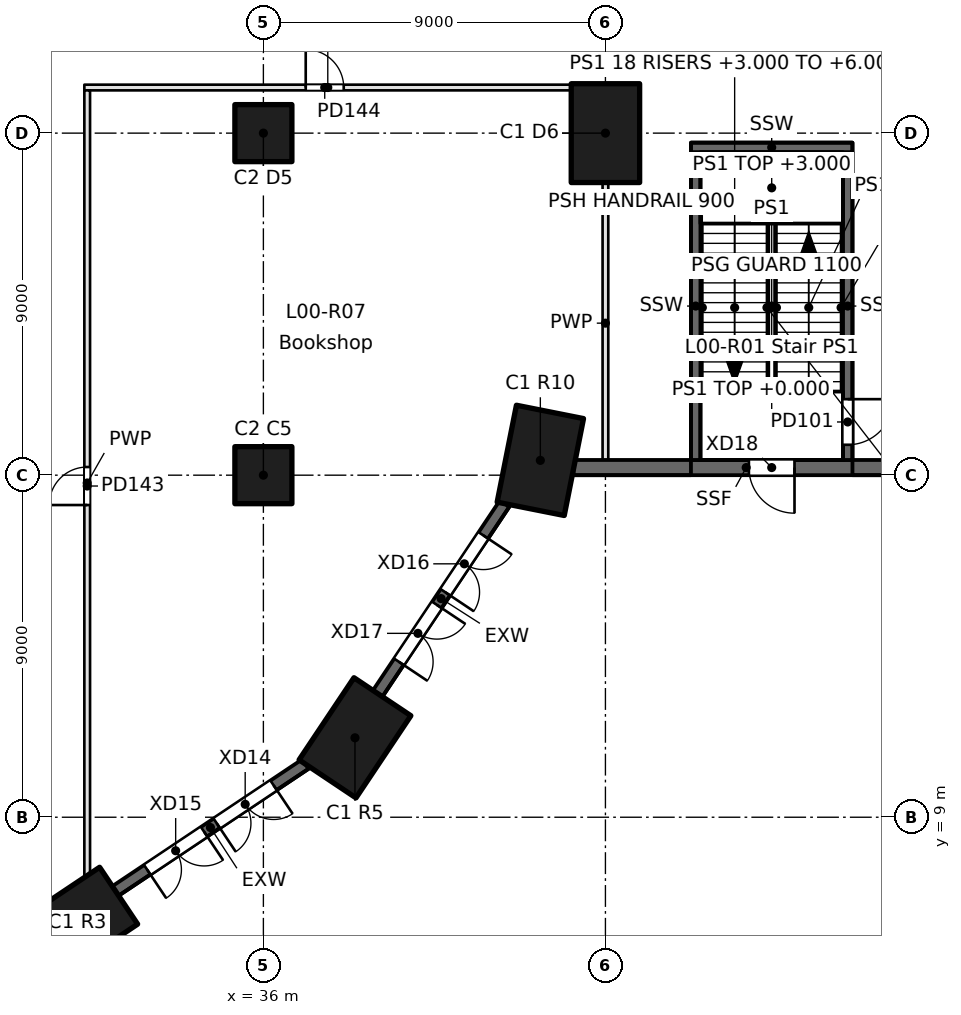
"""IFC4 building model, lengths in metres.
Left out: names, types, materials, properties, quantities, classifications, styles, units other than length and angle.
Written with IfcOpenShell. Run it as: python <this file> out.ifc"""

import sys

from ifc_helpers import new_model, si_unit, direction, frame, frame_2d, origin, origin_2d, place, context, subcontext, project, spatial, rectangle, extrude, element, fill, save


model = new_model("IFC4")
c1 = context("Model", 3, precision=1e-05, world=origin(), true_north=direction((0.0, 1.0)))
c2 = subcontext(c1, "Body", "Model", "MODEL_VIEW")
j1 = project(units=[si_unit("LENGTHUNIT", "METRE"), si_unit("PLANEANGLEUNIT", "RADIAN")], contexts=[c1])
p1 = place(None, origin())
s1 = spatial("IfcSite", under=j1, at=p1, CompositionType="ELEMENT")
p2 = place(p1, origin())
s2 = spatial("IfcBuilding", under=s1, at=p2, CompositionType="ELEMENT")
p3 = place(p2, origin())
s3 = spatial("IfcBuildingStorey", under=s2, at=p3, CompositionType="ELEMENT", Elevation=0.0)
for number, where, z_axis, x_axis in (
    (1, (31.11, 6.213, 0.0), (0.0, 0.0, 1.0), (0.831, 0.556, 0.0)),
    (2, (38.41, 11.09, 0.0), (0.0, 0.0, 1.0), (0.556, 0.831, 0.0)),
    (3, (43.287, 18.39, 0.0), (0.0, 0.0, 1.0), (0.195, 0.981, 0.0)),
    (4, (45.0, 27.0, 0.0), (0.0, 0.0, 1.0), (0.0, 1.0, 0.0)),
):
    element("IfcColumn", number, at=place(p3, frame(where, z_axis=z_axis, x_axis=x_axis)), inside=s3, PredefinedType="COLUMN", context=c2, shape_type="SweptSolid", body=[
        extrude(rectangle(XDim=2.6, YDim=1.8, at=origin_2d()), origin(), (0.0, 0.0, 1.0), 6.0),
    ])
for number, where, z_axis, x_axis in (
    (5, (36.0, 18.0, 0.0), (0.0, 0.0, 1.0), (1.0, 0.0, 0.0)),
    (6, (36.0, 27.0, 0.0), (0.0, 0.0, 1.0), (1.0, 0.0, 0.0)),
):
    element("IfcColumn", number, at=place(p3, frame(where, z_axis=z_axis, x_axis=x_axis)), inside=s3, PredefinedType="COLUMN", context=c2, shape_type="SweptSolid", body=[
        extrude(rectangle(XDim=1.5, YDim=1.5, at=origin_2d()), origin(), (0.0, 0.0, 1.0), 6.0),
    ])
p4 = place(p3, frame((47.375, 18.4, 0.0), z_axis=(0.0, 0.0, 1.0), x_axis=(0.0, 1.0, 0.0)))
e7 = element("IfcWall", 7, at=p4, inside=s3, PredefinedType="SOLIDWALL", context=c2, shape_type="SweptSolid", body=[
    extrude(rectangle(XDim=8.1, YDim=0.25, at=frame_2d((4.05, 0.0))), origin(), (0.0, 0.0, 1.0), 6.0),
])
p5 = place(p3, frame((51.375, 26.5, 0.0), z_axis=(0.0, 0.0, 1.0), x_axis=(0.0, -1.0, 0.0)))
e8 = element("IfcWall", 8, at=p5, inside=s3, PredefinedType="SOLIDWALL", context=c2, shape_type="SweptSolid", body=[
    extrude(rectangle(XDim=8.1, YDim=0.25, at=frame_2d((4.05, 0.0))), origin(), (0.0, 0.0, 1.0), 6.0),
])
p6 = place(p5, frame((6.5, 0.0, 0.0)))
e9 = element("IfcOpeningElement", 9, at=p6, cuts=e8, PredefinedType="OPENING", context=c2, shape_type="SweptSolid", body=[
    extrude(rectangle(XDim=1.2, YDim=2.1, at=frame_2d((0.6, 1.05))), frame((0.0, 0.125, 0.0), z_axis=(0.0, -1.0, 0.0), x_axis=(1.0, 0.0, 0.0)), (0.0, 0.0, 1.0), 0.25),
])
p7 = place(p3, frame((47.25, 26.625, 0.0), z_axis=(0.0, 0.0, 1.0), x_axis=(1.0, 0.0, 0.0)))
e10 = element("IfcWall", 10, at=p7, inside=s3, PredefinedType="SOLIDWALL", context=c2, shape_type="SweptSolid", body=[
    extrude(rectangle(XDim=4.25, YDim=0.25, at=frame_2d((2.125, 0.0))), origin(), (0.0, 0.0, 1.0), 6.0),
])
p8 = place(p3, frame((37.105, 10.399, 0.0), z_axis=(0.0, 0.0, 1.0), x_axis=(-0.831474873365, -0.555562359202, 0.0)))
e11 = element("IfcWall", 11, at=p8, inside=s3, PredefinedType="SOLIDWALL", context=c2, shape_type="SweptSolid", body=[
    extrude(rectangle(XDim=6.01, YDim=0.3, at=frame_2d((3.005, 0.0))), origin(), (0.0, 0.0, 1.0), 5.65),
])
p9 = place(p8, frame((1.005, 0.0, 0.0)))
e12 = element("IfcOpeningElement", 12, at=p9, cuts=e11, PredefinedType="OPENING", context=c2, shape_type="SweptSolid", body=[
    extrude(rectangle(XDim=1.8, YDim=2.4, at=frame_2d((0.9, 1.2))), frame((0.0, 0.15, 0.0), z_axis=(0.0, -1.0, 0.0), x_axis=(1.0, 0.0, 0.0)), (0.0, 0.0, 1.0), 0.3),
])
p10 = place(p8, frame((3.205, 0.0, 0.0)))
e13 = element("IfcOpeningElement", 13, at=p10, cuts=e11, PredefinedType="OPENING", context=c2, shape_type="SweptSolid", body=[
    extrude(rectangle(XDim=1.8, YDim=2.4, at=frame_2d((0.9, 1.2))), frame((0.0, 0.15, 0.0), z_axis=(0.0, -1.0, 0.0), x_axis=(1.0, 0.0, 0.0)), (0.0, 0.0, 1.0), 0.3),
])
p11 = place(p3, frame((42.346, 17.251, 0.0), z_axis=(0.0, 0.0, 1.0), x_axis=(-0.555581125001, -0.83146233441, 0.0)))
e14 = element("IfcWall", 14, at=p11, inside=s3, PredefinedType="SOLIDWALL", context=c2, shape_type="SweptSolid", body=[
    extrude(rectangle(XDim=6.01, YDim=0.3, at=frame_2d((3.005, 0.0))), origin(), (0.0, 0.0, 1.0), 5.65),
])
p12 = place(p11, frame((1.005, 0.0, 0.0)))
e15 = element("IfcOpeningElement", 15, at=p12, cuts=e14, PredefinedType="OPENING", context=c2, shape_type="SweptSolid", body=[
    extrude(rectangle(XDim=1.8, YDim=2.4, at=frame_2d((0.9, 1.2))), frame((0.0, 0.15, 0.0), z_axis=(0.0, -1.0, 0.0), x_axis=(1.0, 0.0, 0.0)), (0.0, 0.0, 1.0), 0.3),
])
p13 = place(p11, frame((3.205, 0.0, 0.0)))
e16 = element("IfcOpeningElement", 16, at=p13, cuts=e14, PredefinedType="OPENING", context=c2, shape_type="SweptSolid", body=[
    extrude(rectangle(XDim=1.8, YDim=2.4, at=frame_2d((0.9, 1.2))), frame((0.0, 0.15, 0.0), z_axis=(0.0, -1.0, 0.0), x_axis=(1.0, 0.0, 0.0)), (0.0, 0.0, 1.0), 0.3),
])
p14 = place(p3, frame((53.25, 18.2, 0.0), z_axis=(0.0, 0.0, 1.0), x_axis=(-1.0, 0.0, 0.0)))
e17 = element("IfcWall", 17, at=p14, inside=s3, PredefinedType="SOLIDWALL", context=c2, shape_type="SweptSolid", body=[
    extrude(rectangle(XDim=9.093, YDim=0.4, at=frame_2d((4.546, 0.0))), origin(), (0.0, 0.0, 1.0), 5.65),
])
p15 = place(p14, frame((3.275, 0.0, 0.0)))
e18 = element("IfcOpeningElement", 18, at=p15, cuts=e17, PredefinedType="OPENING", context=c2, shape_type="SweptSolid", body=[
    extrude(rectangle(XDim=1.2, YDim=2.1, at=frame_2d((0.6, 1.05))), frame((0.0, 0.2, 0.0), z_axis=(0.0, -1.0, 0.0), x_axis=(1.0, 0.0, 0.0)), (0.0, 0.0, 1.0), 0.4),
])
p16 = place(p3, frame((31.289, 28.2, 0.0), z_axis=(0.0, 0.0, 1.0), x_axis=(1.0, 0.0, 0.0)))
e19 = element("IfcWall", 19, at=p16, inside=s3, PredefinedType="PARTITIONING", context=c2, shape_type="SweptSolid", body=[
    extrude(rectangle(XDim=12.811, YDim=0.15, at=frame_2d((6.406, 0.0))), origin(), (0.0, 0.0, 1.0), 5.65),
])
p17 = place(p16, frame((5.825, 0.0, 0.0)))
e20 = element("IfcOpeningElement", 20, at=p17, cuts=e19, PredefinedType="OPENING", context=c2, shape_type="SweptSolid", body=[
    extrude(rectangle(XDim=1.0, YDim=2.1, at=frame_2d((0.5, 1.05))), frame((0.0, 0.075, 0.0), z_axis=(0.0, -1.0, 0.0), x_axis=(1.0, 0.0, 0.0)), (0.0, 0.0, 1.0), 0.15),
])
p18 = place(p3, frame((31.364, 7.465, 0.0), z_axis=(0.0, 0.0, 1.0), x_axis=(0.0, 1.0, 0.0)))
e21 = element("IfcWall", 21, at=p18, inside=s3, PredefinedType="PARTITIONING", context=c2, shape_type="SweptSolid", body=[
    extrude(rectangle(XDim=20.66, YDim=0.15, at=frame_2d((10.33, 0.0))), origin(), (0.0, 0.0, 1.0), 5.65),
])
p19 = place(p18, frame((9.75, 0.0, 0.0)))
e22 = element("IfcOpeningElement", 22, at=p19, cuts=e21, PredefinedType="OPENING", context=c2, shape_type="SweptSolid", body=[
    extrude(rectangle(XDim=1.0, YDim=2.1, at=frame_2d((0.5, 1.05))), frame((0.0, 0.075, 0.0), z_axis=(0.0, -1.0, 0.0), x_axis=(1.0, 0.0, 0.0)), (0.0, 0.0, 1.0), 0.15),
])
p20 = place(p3, frame((45.0, 25.7, 0.0), z_axis=(0.0, 0.0, 1.0), x_axis=(0.0, -1.0, 0.0)))
e23 = element("IfcWall", 23, at=p20, inside=s3, PredefinedType="PARTITIONING", context=c2, shape_type="SweptSolid", body=[
    extrude(rectangle(XDim=7.4, YDim=0.15, at=frame_2d((3.7, 0.0))), origin(), (0.0, 0.0, 1.0), 5.65),
])
p21 = place(p6, origin())
e24 = element("IfcDoor", 24, at=p21, inside=s3, OperationType="SINGLE_SWING_LEFT", PredefinedType="DOOR", context=c2, shape_type="SweptSolid", body=[
    extrude(rectangle(XDim=1.2, YDim=2.1, at=frame_2d((0.6, 1.05))), frame((0.0, 0.025, 0.0), z_axis=(0.0, -1.0, 0.0), x_axis=(1.0, 0.0, 0.0)), (0.0, 0.0, 1.0), 0.05),
])
fill(e9, e24)
p22 = place(p9, origin())
e25 = element("IfcDoor", 25, at=p22, inside=s3, OperationType="DOUBLE_DOOR_SINGLE_SWING", PredefinedType="DOOR", context=c2, shape_type="SweptSolid", body=[
    extrude(rectangle(XDim=1.8, YDim=2.4, at=frame_2d((0.9, 1.2))), frame((0.0, 0.025, 0.0), z_axis=(0.0, -1.0, 0.0), x_axis=(1.0, 0.0, 0.0)), (0.0, 0.0, 1.0), 0.05),
])
fill(e12, e25)
p23 = place(p10, origin())
e26 = element("IfcDoor", 26, at=p23, inside=s3, OperationType="DOUBLE_DOOR_SINGLE_SWING", PredefinedType="DOOR", context=c2, shape_type="SweptSolid", body=[
    extrude(rectangle(XDim=1.8, YDim=2.4, at=frame_2d((0.9, 1.2))), frame((0.0, 0.025, 0.0), z_axis=(0.0, -1.0, 0.0), x_axis=(1.0, 0.0, 0.0)), (0.0, 0.0, 1.0), 0.05),
])
fill(e13, e26)
p24 = place(p12, origin())
e27 = element("IfcDoor", 27, at=p24, inside=s3, OperationType="DOUBLE_DOOR_SINGLE_SWING", PredefinedType="DOOR", context=c2, shape_type="SweptSolid", body=[
    extrude(rectangle(XDim=1.8, YDim=2.4, at=frame_2d((0.9, 1.2))), frame((0.0, 0.025, 0.0), z_axis=(0.0, -1.0, 0.0), x_axis=(1.0, 0.0, 0.0)), (0.0, 0.0, 1.0), 0.05),
])
fill(e15, e27)
p25 = place(p13, origin())
e28 = element("IfcDoor", 28, at=p25, inside=s3, OperationType="DOUBLE_DOOR_SINGLE_SWING", PredefinedType="DOOR", context=c2, shape_type="SweptSolid", body=[
    extrude(rectangle(XDim=1.8, YDim=2.4, at=frame_2d((0.9, 1.2))), frame((0.0, 0.025, 0.0), z_axis=(0.0, -1.0, 0.0), x_axis=(1.0, 0.0, 0.0)), (0.0, 0.0, 1.0), 0.05),
])
fill(e16, e28)
p26 = place(p15, origin())
e29 = element("IfcDoor", 29, at=p26, inside=s3, OperationType="SINGLE_SWING_LEFT", PredefinedType="DOOR", context=c2, shape_type="SweptSolid", body=[
    extrude(rectangle(XDim=1.2, YDim=2.1, at=frame_2d((0.6, 1.05))), frame((0.0, 0.025, 0.0), z_axis=(0.0, -1.0, 0.0), x_axis=(1.0, 0.0, 0.0)), (0.0, 0.0, 1.0), 0.05),
])
fill(e18, e29)
p27 = place(p19, origin())
e30 = element("IfcDoor", 30, at=p27, inside=s3, OperationType="SINGLE_SWING_LEFT", PredefinedType="DOOR", context=c2, shape_type="SweptSolid", body=[
    extrude(rectangle(XDim=1.0, YDim=2.1, at=frame_2d((0.5, 1.05))), frame((0.0, 0.025, 0.0), z_axis=(0.0, -1.0, 0.0), x_axis=(1.0, 0.0, 0.0)), (0.0, 0.0, 1.0), 0.05),
])
fill(e22, e30)
p28 = place(p17, origin())
e31 = element("IfcDoor", 31, at=p28, inside=s3, OperationType="SINGLE_SWING_LEFT", PredefinedType="DOOR", context=c2, shape_type="SweptSolid", body=[
    extrude(rectangle(XDim=1.0, YDim=2.1, at=frame_2d((0.5, 1.05))), frame((0.0, 0.025, 0.0), z_axis=(0.0, -1.0, 0.0), x_axis=(1.0, 0.0, 0.0)), (0.0, 0.0, 1.0), 0.05),
])
fill(e20, e31)
save(model, sys.argv[1])
